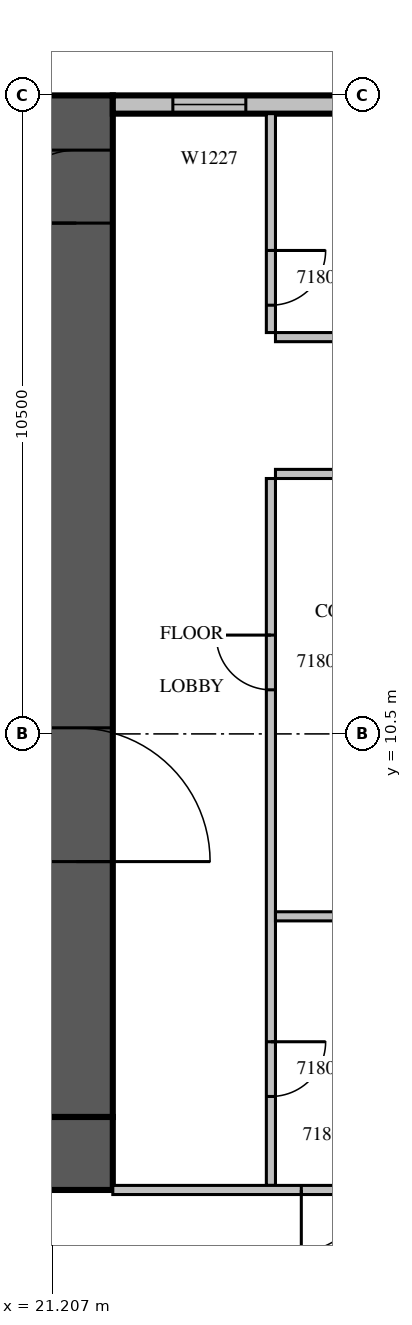
"""IFC4 building model, lengths in metres.
Left out: names, types, materials, properties, quantities, classifications, styles, units other than length and angle.
Written with IfcOpenShell. Run it as: python <this file> out.ifc"""

import sys

from ifc_helpers import new_model, si_unit, direction, frame, frame_2d, origin, place, context, subcontext, project, spatial, rectangle, extrude, source, transform, mapped, element, fill, save


model = new_model("IFC4")
c1 = context("Model", 3, precision=1e-05, world=origin(), true_north=direction((0.0, 1.0)))
c2 = subcontext(c1, "Body", "Model", "MODEL_VIEW")
j1 = project(units=[si_unit("LENGTHUNIT", "METRE"), si_unit("PLANEANGLEUNIT", "RADIAN")], contexts=[c1])
p1 = place(None, origin())
s1 = spatial("IfcSite", under=j1, at=p1, CompositionType="ELEMENT")
p2 = place(p1, origin())
s2 = spatial("IfcBuilding", under=s1, at=p2, CompositionType="ELEMENT")
p3 = place(p2, frame((0.0, 0.0, 86.7)))
s3 = spatial("IfcBuildingStorey", under=s2, at=p3, CompositionType="ELEMENT", Elevation=86.7)
m1 = source(origin(), c2, "Body", "SweptSolid", [
    extrude(rectangle(XDim=16.8, YDim=1.2, at=frame_2d((8.4, 0.0))), origin(), (0.0, 0.0, 1.0), 4.2),
])
p4 = place(p3, frame((21.6, 4.2, 0.0), z_axis=(0.0, 0.0, 1.0), x_axis=(0.0, 1.0, 0.0)))
e1 = element("IfcWall", 1, at=p4, inside=s3, PredefinedType="SHEAR", context=c2, shape_type="MappedRepresentation", body=[
    mapped(m1, transform((0.0, 0.0, 0.0), scale=1.0)),
])
m2 = source(origin(), c2, "Body", "SweptSolid", [
    extrude(rectangle(XDim=2.2, YDim=2.1, at=frame_2d((1.1, 1.05))), frame((0.0, 0.61, 0.0), z_axis=(0.0, -1.0, 0.0), x_axis=(1.0, 0.0, 0.0)), (0.0, 0.0, 1.0), 1.22),
])
p5 = place(p4, frame((4.2, 0.0, 0.0)))
e2 = element("IfcOpeningElement", 2, at=p5, cuts=e1, PredefinedType="OPENING", context=c2, shape_type="MappedRepresentation", body=[
    mapped(m2, transform((0.0, 0.0, 0.0), scale=1.0)),
])
m3 = source(origin(), c2, "Body", "SweptSolid", [
    extrude(rectangle(XDim=1.2, YDim=2.1, at=frame_2d((0.6, 1.05))), frame((0.0, 0.61, 0.0), z_axis=(0.0, -1.0, 0.0), x_axis=(1.0, 0.0, 0.0)), (0.0, 0.0, 1.0), 1.22),
])
p6 = place(p4, frame((14.7, 0.0, 0.0)))
e3 = element("IfcOpeningElement", 3, at=p6, cuts=e1, PredefinedType="OPENING", context=c2, shape_type="MappedRepresentation", body=[
    mapped(m3, transform((0.0, 0.0, 0.0), scale=1.0)),
])
m4 = source(origin(), c2, "Body", "SweptSolid", [
    extrude(rectangle(XDim=18.0, YDim=1.2, at=frame_2d((9.0, 0.0))), origin(), (0.0, 0.0, 1.0), 4.2),
])
p7 = place(p3, frame((4.2, 3.6, 0.0), z_axis=(0.0, 0.0, 1.0), x_axis=(1.0, 0.0, 0.0)))
e4 = element("IfcWall", 4, at=p7, inside=s3, PredefinedType="SHEAR", context=c2, shape_type="MappedRepresentation", body=[
    mapped(m4, transform((0.0, 0.0, 0.0), scale=1.0)),
])
m5 = source(origin(), c2, "Body", "SweptSolid", [
    extrude(rectangle(XDim=6.6, YDim=0.3, at=frame_2d((3.3, 0.0))), origin(), (0.0, 0.0, 1.0), 3.8),
])
p8 = place(p3, frame((28.8, 20.85, 0.0), z_axis=(0.0, 0.0, 1.0), x_axis=(-1.0, 0.0, 0.0)))
e5 = element("IfcWall", 5, at=p8, inside=s3, PredefinedType="STANDARD", context=c2, shape_type="MappedRepresentation", body=[
    mapped(m5, transform((0.0, 0.0, 0.0), scale=1.0)),
])
m6 = source(origin(), c2, "Body", "SweptSolid", [
    extrude(rectangle(XDim=2.4, YDim=2.7, at=frame_2d((1.2, 1.35))), frame((0.0, 0.16, 0.0), z_axis=(0.0, -1.0, 0.0), x_axis=(1.0, 0.0, 0.0)), (0.0, 0.0, 1.0), 0.32),
])
p9 = place(p8, frame((0.3, 0.0, 0.6)))
e6 = element("IfcOpeningElement", 6, at=p9, cuts=e5, PredefinedType="OPENING", context=c2, shape_type="MappedRepresentation", body=[
    mapped(m6, transform((0.0, 0.0, 0.0), scale=1.0)),
])
m7 = source(origin(), c2, "Body", "SweptSolid", [
    extrude(rectangle(XDim=1.2, YDim=2.7, at=frame_2d((0.6, 1.35))), frame((0.0, 0.16, 0.0), z_axis=(0.0, -1.0, 0.0), x_axis=(1.0, 0.0, 0.0)), (0.0, 0.0, 1.0), 0.32),
])
p10 = place(p8, frame((4.412, 0.0, 0.6)))
e7 = element("IfcOpeningElement", 7, at=p10, cuts=e5, PredefinedType="OPENING", context=c2, shape_type="MappedRepresentation", body=[
    mapped(m7, transform((0.0, 0.0, 0.0), scale=1.0)),
])
m8 = source(origin(), c2, "Body", "SweptSolid", [
    extrude(rectangle(XDim=11.625, YDim=0.15, at=frame_2d((5.812, 0.0))), origin(), (0.0, 0.0, 1.0), 3.8),
])
p11 = place(p3, frame((24.8, 14.7, 0.0), z_axis=(0.0, 0.0, 1.0), x_axis=(0.0, -1.0, 0.0)))
e8 = element("IfcWall", 8, at=p11, inside=s3, PredefinedType="PARTITIONING", context=c2, shape_type="MappedRepresentation", body=[
    mapped(m8, transform((0.0, 0.0, 0.0), scale=1.0)),
])
m9 = source(origin(), c2, "Body", "SweptSolid", [
    extrude(rectangle(XDim=0.9, YDim=2.1, at=frame_2d((0.45, 1.05))), frame((0.0, 0.085, 0.0), z_axis=(0.0, -1.0, 0.0), x_axis=(1.0, 0.0, 0.0)), (0.0, 0.0, 1.0), 0.17),
])
p12 = place(p11, frame((9.262, 0.0, 0.0)))
e9 = element("IfcOpeningElement", 9, at=p12, cuts=e8, PredefinedType="OPENING", context=c2, shape_type="MappedRepresentation", body=[
    mapped(m9, transform((0.0, 0.0, 0.0), scale=1.0)),
])
p13 = place(p11, frame((2.575, 0.0, 0.0)))
e10 = element("IfcOpeningElement", 10, at=p13, cuts=e8, PredefinedType="OPENING", context=c2, shape_type="MappedRepresentation", body=[
    mapped(m9, transform((0.0, 0.0, 0.0), scale=1.0)),
])
m10 = source(origin(), c2, "Body", "SweptSolid", [
    extrude(rectangle(XDim=3.6, YDim=0.15, at=frame_2d((1.8, 0.0))), origin(), (0.0, 0.0, 1.0), 3.8),
])
p14 = place(p3, frame((24.8, 20.7, 0.0), z_axis=(0.0, 0.0, 1.0), x_axis=(0.0, -1.0, 0.0)))
e11 = element("IfcWall", 11, at=p14, inside=s3, PredefinedType="PARTITIONING", context=c2, shape_type="MappedRepresentation", body=[
    mapped(m10, transform((0.0, 0.0, 0.0), scale=1.0)),
])
p15 = place(p14, frame((2.25, 0.0, 0.0)))
e12 = element("IfcOpeningElement", 12, at=p15, cuts=e11, PredefinedType="OPENING", context=c2, shape_type="MappedRepresentation", body=[
    mapped(m9, transform((0.0, 0.0, 0.0), scale=1.0)),
])
m11 = source(origin(), c2, "Body", "SweptSolid", [
    extrude(rectangle(XDim=4.45, YDim=0.15, at=frame_2d((2.225, 0.0))), origin(), (0.0, 0.0, 1.0), 3.8),
])
for number, where, z_axis, x_axis in (
    (13, (29.325, 7.5, 0.0), (0.0, 0.0, 1.0), (-1.0, 0.0, 0.0)),
    (14, (29.325, 14.775, 0.0), (0.0, 0.0, 1.0), (-1.0, 0.0, 0.0)),
    (15, (24.875, 17.025, 0.0), (0.0, 0.0, 1.0), (1.0, 0.0, 0.0)),
):
    element("IfcWall", number, at=place(p3, frame(where, z_axis=z_axis, x_axis=x_axis)), inside=s3, PredefinedType="PARTITIONING", context=c2, shape_type="MappedRepresentation", body=[
        mapped(m11, transform((0.0, 0.0, 0.0), scale=1.0)),
    ])
m12 = source(origin(), c2, "Body", "SweptSolid", [
    extrude(rectangle(XDim=7.125, YDim=0.15, at=frame_2d((3.562, 0.0))), origin(), (0.0, 0.0, 1.0), 3.8),
])
p16 = place(p3, frame((22.2, 3.0, 0.0), z_axis=(0.0, 0.0, 1.0), x_axis=(1.0, 0.0, 0.0)))
e16 = element("IfcWall", 16, at=p16, inside=s3, PredefinedType="PARTITIONING", context=c2, shape_type="MappedRepresentation", body=[
    mapped(m12, transform((0.0, 0.0, 0.0), scale=1.0)),
])
m13 = source(origin(), c2, "Body", "SweptSolid", [
    extrude(rectangle(XDim=1.0, YDim=2.1, at=frame_2d((0.5, 1.05))), frame((0.0, 0.085, 0.0), z_axis=(0.0, -1.0, 0.0), x_axis=(1.0, 0.0, 0.0)), (0.0, 0.0, 1.0), 0.17),
])
p17 = place(p16, frame((3.1, 0.0, 0.0)))
e17 = element("IfcOpeningElement", 17, at=p17, cuts=e16, PredefinedType="OPENING", context=c2, shape_type="MappedRepresentation", body=[
    mapped(m13, transform((0.0, 0.0, 0.0), scale=1.0)),
])
p18 = place(p16, frame((4.162, 0.0, 0.0)))
e18 = element("IfcOpeningElement", 18, at=p18, cuts=e16, PredefinedType="OPENING", context=c2, shape_type="MappedRepresentation", body=[
    mapped(m9, transform((0.0, 0.0, 0.0), scale=1.0)),
])
m14 = source(origin(), c2, "Body", "SweptSolid", [
    extrude(rectangle(XDim=1.2, YDim=2.7, at=frame_2d((0.6, 1.35))), frame((0.0, 0.03, 0.0), z_axis=(0.0, -1.0, 0.0), x_axis=(1.0, 0.0, 0.0)), (0.0, 0.0, 1.0), 0.06),
])
p19 = place(p10, origin())
e19 = element("IfcWindow", 19, at=p19, inside=s3, PartitioningType="SINGLE_PANEL", PredefinedType="WINDOW", context=c2, shape_type="MappedRepresentation", body=[
    mapped(m14, transform((0.0, 0.0, 0.0), scale=1.0)),
])
fill(e7, e19)
m15 = source(origin(), c2, "Body", "SweptSolid", [
    extrude(rectangle(XDim=2.2, YDim=2.1, at=frame_2d((1.1, 1.05))), frame((0.0, 0.025, 0.0), z_axis=(0.0, -1.0, 0.0), x_axis=(1.0, 0.0, 0.0)), (0.0, 0.0, 1.0), 0.05),
])
p20 = place(p5, origin())
e20 = element("IfcDoor", 20, at=p20, inside=s3, OperationType="DOUBLE_DOOR_SINGLE_SWING", PredefinedType="DOOR", context=c2, shape_type="MappedRepresentation", body=[
    mapped(m15, transform((0.0, 0.0, 0.0), scale=1.0)),
])
fill(e2, e20)
m16 = source(origin(), c2, "Body", "SweptSolid", [
    extrude(rectangle(XDim=1.2, YDim=2.1, at=frame_2d((0.6, 1.05))), frame((0.0, 0.025, 0.0), z_axis=(0.0, -1.0, 0.0), x_axis=(1.0, 0.0, 0.0)), (0.0, 0.0, 1.0), 0.05),
])
p21 = place(p6, origin())
e21 = element("IfcDoor", 21, at=p21, inside=s3, OperationType="SINGLE_SWING_LEFT", PredefinedType="DOOR", context=c2, shape_type="MappedRepresentation", body=[
    mapped(m16, transform((0.0, 0.0, 0.0), scale=1.0)),
])
fill(e3, e21)
m17 = source(origin(), c2, "Body", "SweptSolid", [
    extrude(rectangle(XDim=0.9, YDim=2.1, at=frame_2d((0.45, 1.05))), frame((0.0, 0.025, 0.0), z_axis=(0.0, -1.0, 0.0), x_axis=(1.0, 0.0, 0.0)), (0.0, 0.0, 1.0), 0.05),
])
p22 = place(p12, origin())
e22 = element("IfcDoor", 22, at=p22, inside=s3, OperationType="SINGLE_SWING_LEFT", PredefinedType="DOOR", context=c2, shape_type="MappedRepresentation", body=[
    mapped(m17, transform((0.0, 0.0, 0.0), scale=1.0)),
])
fill(e9, e22)
p23 = place(p13, origin())
e23 = element("IfcDoor", 23, at=p23, inside=s3, OperationType="SINGLE_SWING_RIGHT", PredefinedType="DOOR", context=c2, shape_type="MappedRepresentation", body=[
    mapped(m17, transform((0.0, 0.0, 0.0), scale=1.0)),
])
fill(e10, e23)
p24 = place(p15, origin())
e24 = element("IfcDoor", 24, at=p24, inside=s3, OperationType="SINGLE_SWING_LEFT", PredefinedType="DOOR", context=c2, shape_type="MappedRepresentation", body=[
    mapped(m17, transform((0.0, 0.0, 0.0), scale=1.0)),
])
fill(e12, e24)
m18 = source(origin(), c2, "Body", "SweptSolid", [
    extrude(rectangle(XDim=1.0, YDim=2.1, at=frame_2d((0.5, 1.05))), frame((0.0, 0.025, 0.0), z_axis=(0.0, -1.0, 0.0), x_axis=(1.0, 0.0, 0.0)), (0.0, 0.0, 1.0), 0.05),
])
p25 = place(p17, origin())
e25 = element("IfcDoor", 25, at=p25, inside=s3, OperationType="SINGLE_SWING_RIGHT", PredefinedType="DOOR", context=c2, shape_type="MappedRepresentation", body=[
    mapped(m18, transform((0.0, 0.0, 0.0), scale=1.0)),
])
fill(e17, e25)
save(model, sys.argv[1])
